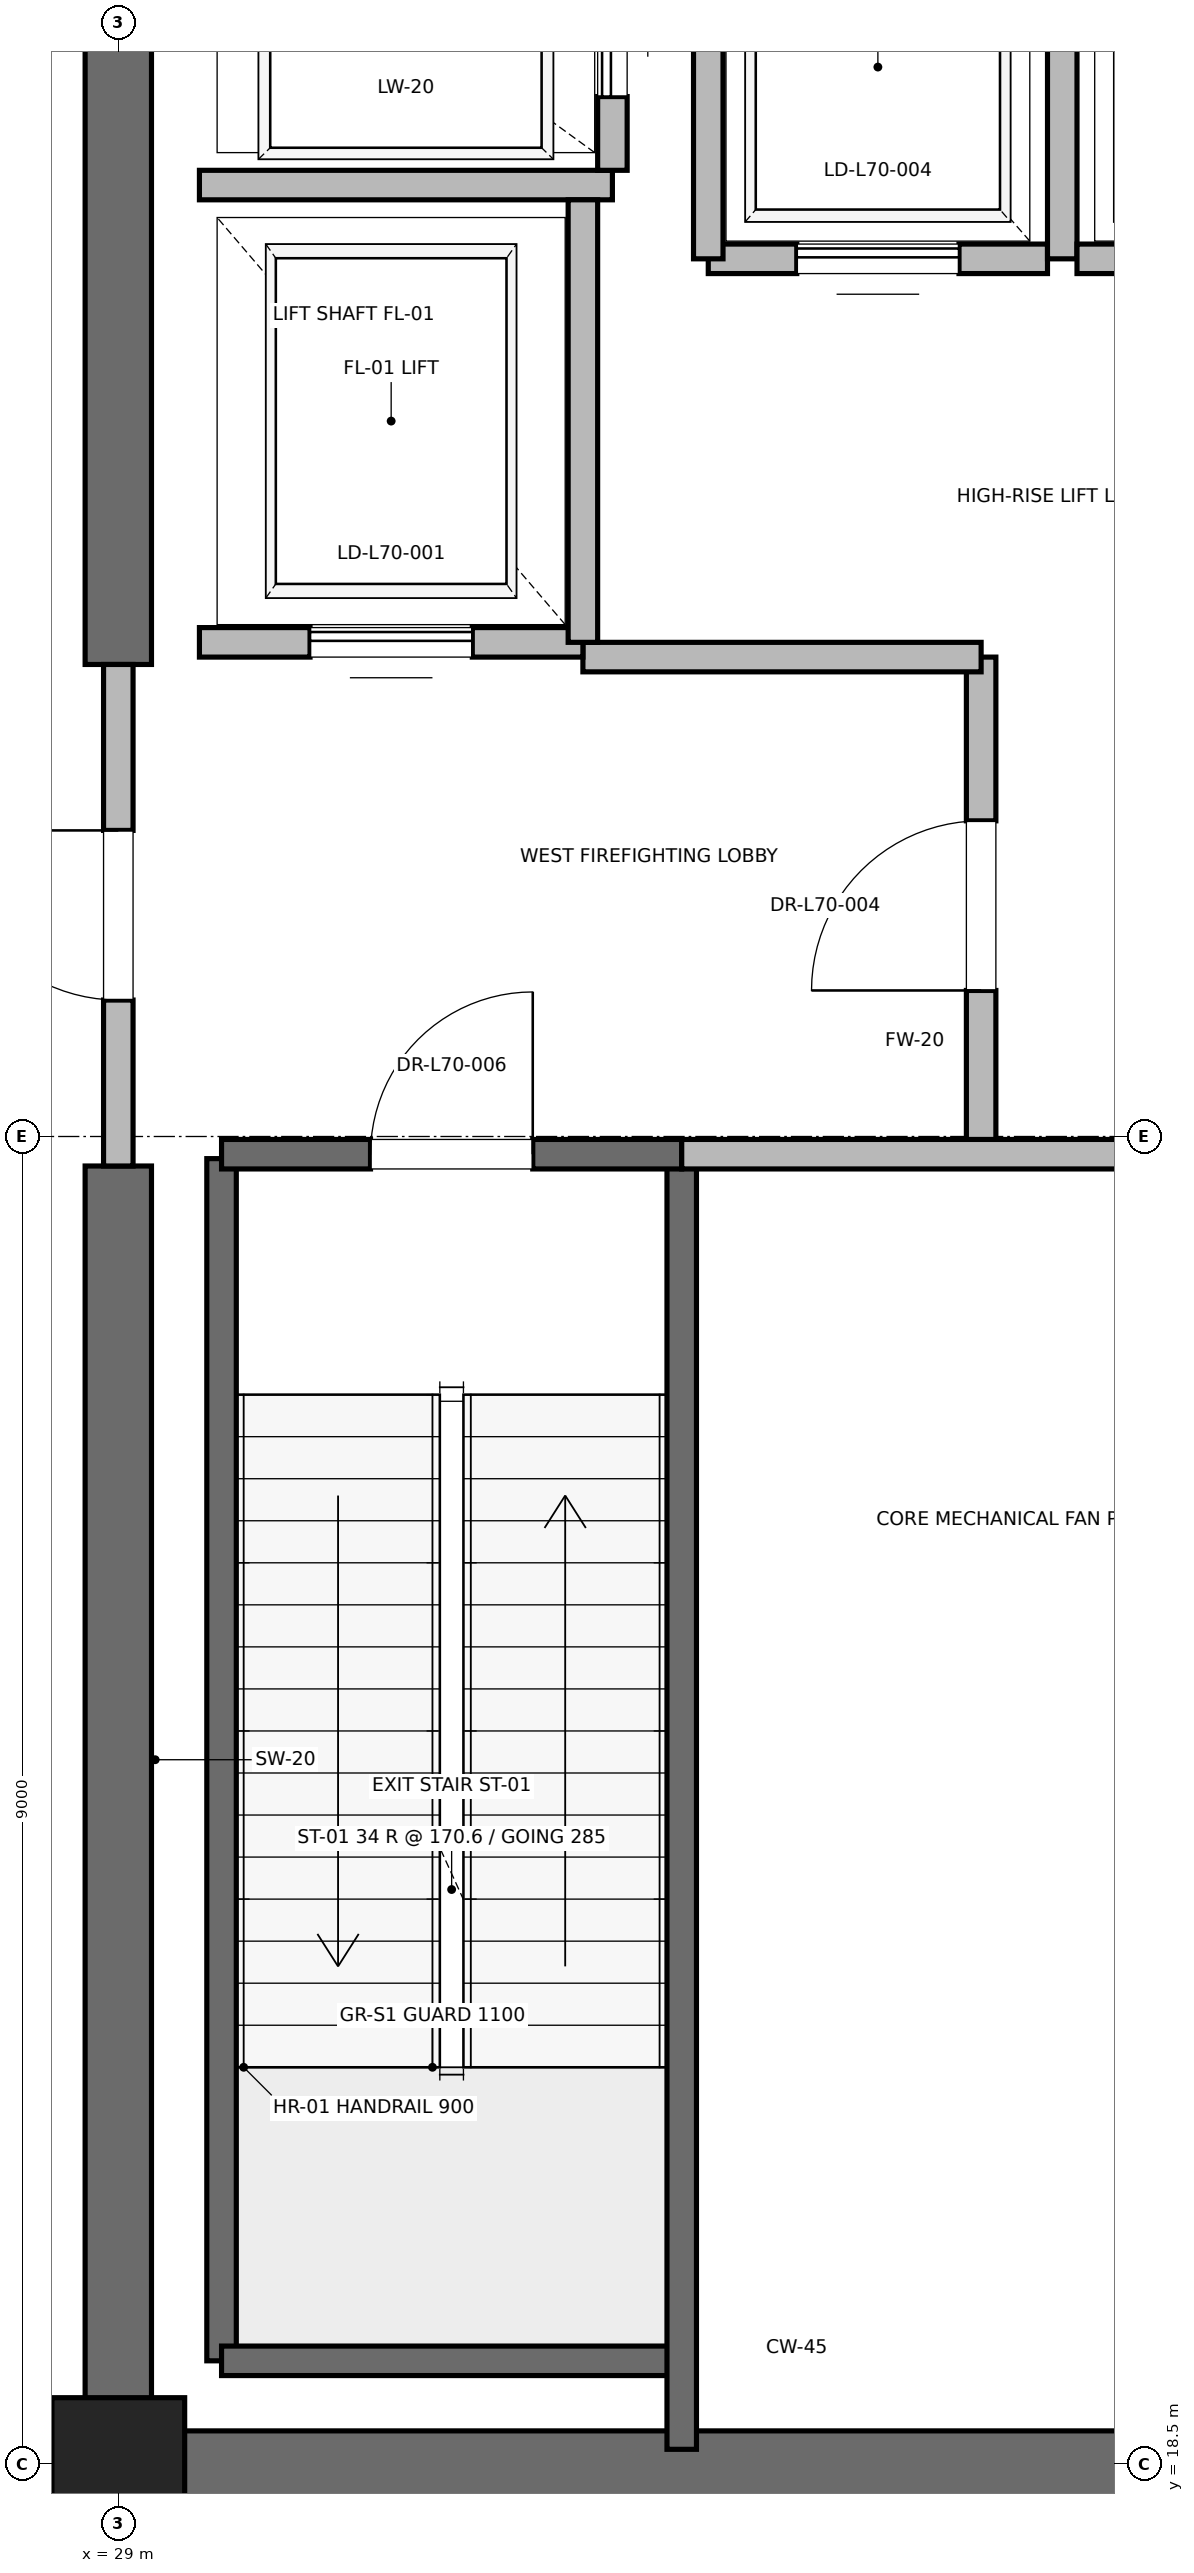
"""IFC4 building model, lengths in metres.
Left out: names, types, materials, properties, quantities, classifications, styles, units other than length and angle.
Written with IfcOpenShell. Run it as: python <this file> out.ifc"""

import sys

from ifc_helpers import new_model, si_unit, direction, frame, frame_2d, origin, origin_2d, place, context, subcontext, project, spatial, rectangle, extrude, element, fill, save


model = new_model("IFC4")
c1 = context("Model", 3, precision=1e-05, world=origin(), true_north=direction((0.0, 1.0)))
c2 = subcontext(c1, "Body", "Model", "MODEL_VIEW")
j1 = project(units=[si_unit("LENGTHUNIT", "METRE"), si_unit("PLANEANGLEUNIT", "RADIAN")], contexts=[c1])
p1 = place(None, origin())
s1 = spatial("IfcSite", under=j1, at=p1, CompositionType="ELEMENT")
p2 = place(p1, origin())
s2 = spatial("IfcBuilding", under=s1, at=p2, CompositionType="ELEMENT")
p3 = place(p2, frame((0.0, 0.0, 301.0)))
s3 = spatial("IfcBuildingStorey", under=s2, at=p3, CompositionType="ELEMENT", Elevation=301.0)
p4 = place(p3, frame((29.0, 18.5, 0.0), z_axis=(0.0, 0.0, 1.0), x_axis=(1.0, 0.0, 0.0)))
e1 = element("IfcColumn", 1, at=p4, inside=s3, PredefinedType="PILASTER", context=c2, shape_type="SweptSolid", body=[
    extrude(rectangle(XDim=0.9, YDim=0.9, at=origin_2d()), origin(), (0.0, 0.0, 1.0), 5.8),
])
p5 = place(p3, frame((29.0, 18.5, 0.0), z_axis=(0.0, 0.0, 1.0), x_axis=(1.0, 0.0, 0.0)))
e2 = element("IfcWall", 2, at=p5, inside=s3, PredefinedType="SHEAR", context=c2, shape_type="SweptSolid", body=[
    extrude(rectangle(XDim=9.2, YDim=0.45, at=frame_2d((4.6, 0.0))), origin(), (0.0, 0.0, 1.0), 5.585),
])
p6 = place(p3, frame((29.0, 18.5, 0.0), z_axis=(0.0, 0.0, 1.0), x_axis=(0.0, 1.0, 0.0)))
e3 = element("IfcWall", 3, at=p6, inside=s3, PredefinedType="SHEAR", context=c2, shape_type="SweptSolid", body=[
    extrude(rectangle(XDim=8.8, YDim=0.45, at=frame_2d((4.4, 0.0))), origin(), (0.0, 0.0, 1.0), 5.585),
])
p7 = place(p3, frame((29.0, 30.7, 0.0), z_axis=(0.0, 0.0, 1.0), x_axis=(0.0, 1.0, 0.0)))
e4 = element("IfcWall", 4, at=p7, inside=s3, PredefinedType="SHEAR", context=c2, shape_type="SweptSolid", body=[
    extrude(rectangle(XDim=5.8, YDim=0.45, at=frame_2d((2.9, 0.0))), origin(), (0.0, 0.0, 1.0), 5.585),
])
p8 = place(p3, frame((29.7, 19.2, 0.0), z_axis=(0.0, 0.0, 1.0), x_axis=(0.0, 1.0, 0.0)))
e5 = element("IfcWall", 5, at=p8, inside=s3, PredefinedType="SOLIDWALL", context=c2, shape_type="SweptSolid", body=[
    extrude(rectangle(XDim=8.15, YDim=0.2, at=frame_2d((4.075, 0.0))), origin(), (0.0, 0.0, 1.0), 5.585),
])
p9 = place(p3, frame((29.7, 19.2, 0.0), z_axis=(0.0, 0.0, 1.0), x_axis=(1.0, 0.0, 0.0)))
e6 = element("IfcWall", 6, at=p9, inside=s3, PredefinedType="SOLIDWALL", context=c2, shape_type="SweptSolid", body=[
    extrude(rectangle(XDim=3.12, YDim=0.2, at=frame_2d((1.56, 0.0))), origin(), (0.0, 0.0, 1.0), 5.585),
])
p10 = place(p3, frame((32.82, 18.6, 0.0), z_axis=(0.0, 0.0, 1.0), x_axis=(0.0, 1.0, 0.0)))
e7 = element("IfcWall", 7, at=p10, inside=s3, PredefinedType="SOLIDWALL", context=c2, shape_type="SweptSolid", body=[
    extrude(rectangle(XDim=8.78, YDim=0.2, at=frame_2d((4.39, 0.0))), origin(), (0.0, 0.0, 1.0), 5.585),
])
p11 = place(p3, frame((29.7, 27.38, 0.0), z_axis=(0.0, 0.0, 1.0), x_axis=(1.0, 0.0, 0.0)))
e8 = element("IfcWall", 8, at=p11, inside=s3, PredefinedType="SOLIDWALL", context=c2, shape_type="SweptSolid", body=[
    extrude(rectangle(XDim=3.12, YDim=0.2, at=frame_2d((1.56, 0.0))), origin(), (0.0, 0.0, 1.0), 5.585),
])
p12 = place(p11, frame((1.01, 0.0, 0.0)))
e9 = element("IfcOpeningElement", 9, at=p12, cuts=e8, PredefinedType="OPENING", context=c2, shape_type="SweptSolid", body=[
    extrude(rectangle(XDim=1.1, YDim=2.15, at=frame_2d((0.55, 1.075))), frame((0.0, 0.1, 0.0), z_axis=(0.0, -1.0, 0.0), x_axis=(1.0, 0.0, 0.0)), (0.0, 0.0, 1.0), 0.2),
])
p13 = place(p3, frame((34.85, 27.38, 0.0), z_axis=(0.0, 0.0, 1.0), x_axis=(0.0, 1.0, 0.0)))
e10 = element("IfcWall", 10, at=p13, inside=s3, PredefinedType="PARTITIONING", context=c2, shape_type="SweptSolid", body=[
    extrude(rectangle(XDim=3.37, YDim=0.2, at=frame_2d((1.685, 0.0))), origin(), (0.0, 0.0, 1.0), 5.585),
])
p14 = place(p13, frame((1.11, 0.0, 0.0)))
e11 = element("IfcOpeningElement", 11, at=p14, cuts=e10, PredefinedType="OPENING", context=c2, shape_type="SweptSolid", body=[
    extrude(rectangle(XDim=1.15, YDim=2.2, at=frame_2d((0.575, 1.1))), frame((0.0, 0.1, 0.0), z_axis=(0.0, -1.0, 0.0), x_axis=(1.0, 0.0, 0.0)), (0.0, 0.0, 1.0), 0.2),
])
p15 = place(p3, frame((29.0, 27.3, 0.0), z_axis=(0.0, 0.0, 1.0), x_axis=(0.0, 1.0, 0.0)))
e12 = element("IfcWall", 12, at=p15, inside=s3, PredefinedType="PARTITIONING", context=c2, shape_type="SweptSolid", body=[
    extrude(rectangle(XDim=3.4, YDim=0.2, at=frame_2d((1.7, 0.0))), origin(), (0.0, 0.0, 1.0), 4.665),
])
p16 = place(p15, frame((1.125, 0.0, 0.0)))
e13 = element("IfcOpeningElement", 13, at=p16, cuts=e12, PredefinedType="OPENING", context=c2, shape_type="SweptSolid", body=[
    extrude(rectangle(XDim=1.15, YDim=2.2, at=frame_2d((0.575, 1.1))), frame((0.0, 0.1, 0.0), z_axis=(0.0, -1.0, 0.0), x_axis=(1.0, 0.0, 0.0)), (0.0, 0.0, 1.0), 0.2),
])
p17 = place(p3, frame((32.82, 27.38, 0.0), z_axis=(0.0, 0.0, 1.0), x_axis=(1.0, 0.0, 0.0)))
e14 = element("IfcWall", 14, at=p17, inside=s3, PredefinedType="PARTITIONING", context=c2, shape_type="SweptSolid", body=[
    extrude(rectangle(XDim=5.62, YDim=0.2, at=frame_2d((2.81, 0.0))), origin(), (0.0, 0.0, 1.0), 5.585),
])
p18 = place(p3, frame((32.15, 30.75, 0.0), z_axis=(0.0, 0.0, 1.0), x_axis=(1.0, 0.0, 0.0)))
e15 = element("IfcWall", 15, at=p18, inside=s3, PredefinedType="PARTITIONING", context=c2, shape_type="SweptSolid", body=[
    extrude(rectangle(XDim=2.7, YDim=0.2, at=frame_2d((1.35, 0.0))), origin(), (0.0, 0.0, 1.0), 5.585),
])
p19 = place(p3, frame((29.55, 30.85, 0.0), z_axis=(0.0, 0.0, 1.0), x_axis=(1.0, 0.0, 0.0)))
e16 = element("IfcWall", 16, at=p19, inside=s3, PredefinedType="SOLIDWALL", context=c2, shape_type="SweptSolid", body=[
    extrude(rectangle(XDim=2.6, YDim=0.2, at=frame_2d((1.3, 0.0))), origin(), (0.0, 0.0, 1.0), 4.665),
])
p20 = place(p19, frame((0.75, 0.0, 0.0)))
e17 = element("IfcOpeningElement", 17, at=p20, cuts=e16, PredefinedType="OPENING", context=c2, shape_type="SweptSolid", body=[
    extrude(rectangle(XDim=1.1, YDim=2.2, at=frame_2d((0.55, 1.1))), frame((0.0, 0.1, 0.0), z_axis=(0.0, -1.0, 0.0), x_axis=(1.0, 0.0, 0.0)), (0.0, 0.0, 1.0), 0.2),
])
p21 = place(p3, frame((29.55, 33.95, 0.0), z_axis=(0.0, 0.0, 1.0), x_axis=(1.0, 0.0, 0.0)))
e18 = element("IfcWall", 18, at=p21, inside=s3, PredefinedType="SOLIDWALL", context=c2, shape_type="SweptSolid", body=[
    extrude(rectangle(XDim=2.8, YDim=0.2, at=frame_2d((1.4, 0.0))), origin(), (0.0, 0.0, 1.0), 5.585),
])
p22 = place(p3, frame((32.15, 30.85, 0.0), z_axis=(0.0, 0.0, 1.0), x_axis=(0.0, 1.0, 0.0)))
e19 = element("IfcWall", 19, at=p22, inside=s3, PredefinedType="SOLIDWALL", context=c2, shape_type="SweptSolid", body=[
    extrude(rectangle(XDim=3.0, YDim=0.2, at=frame_2d((1.5, 0.0))), origin(), (0.0, 0.0, 1.0), 5.585),
])
p23 = place(p3, frame((32.35, 34.05, 0.0), z_axis=(0.0, 0.0, 1.0), x_axis=(0.0, 1.0, 0.0)))
e20 = element("IfcWall", 20, at=p23, inside=s3, PredefinedType="SOLIDWALL", context=c2, shape_type="SweptSolid", body=[
    extrude(rectangle(XDim=2.1, YDim=0.2, at=frame_2d((1.05, 0.0))), origin(), (0.0, 0.0, 1.0), 5.585),
])
p24 = place(p23, frame((0.5, 0.0, 0.0)))
e21 = element("IfcOpeningElement", 21, at=p24, cuts=e20, PredefinedType="OPENING", context=c2, shape_type="SweptSolid", body=[
    extrude(rectangle(XDim=1.1, YDim=2.2, at=frame_2d((0.55, 1.1))), frame((0.0, 0.1, 0.0), z_axis=(0.0, -1.0, 0.0), x_axis=(1.0, 0.0, 0.0)), (0.0, 0.0, 1.0), 0.2),
])
p25 = place(p3, frame((33.0, 33.45, 0.0), z_axis=(0.0, 0.0, 1.0), x_axis=(1.0, 0.0, 0.0)))
e22 = element("IfcWall", 22, at=p25, inside=s3, PredefinedType="SOLIDWALL", context=c2, shape_type="SweptSolid", body=[
    extrude(rectangle(XDim=2.3, YDim=0.2, at=frame_2d((1.15, 0.0))), origin(), (0.0, 0.0, 1.0), 5.585),
])
p26 = place(p25, frame((0.6, 0.0, 0.0)))
e23 = element("IfcOpeningElement", 23, at=p26, cuts=e22, PredefinedType="OPENING", context=c2, shape_type="SweptSolid", body=[
    extrude(rectangle(XDim=1.1, YDim=2.2, at=frame_2d((0.55, 1.1))), frame((0.0, 0.1, 0.0), z_axis=(0.0, -1.0, 0.0), x_axis=(1.0, 0.0, 0.0)), (0.0, 0.0, 1.0), 0.2),
])
p27 = place(p3, frame((33.0, 36.05, 0.0), z_axis=(0.0, 0.0, 1.0), x_axis=(0.0, -1.0, 0.0)))
e24 = element("IfcWall", 24, at=p27, inside=s3, PredefinedType="SOLIDWALL", context=c2, shape_type="SweptSolid", body=[
    extrude(rectangle(XDim=2.6, YDim=0.2, at=frame_2d((1.3, 0.0))), origin(), (0.0, 0.0, 1.0), 5.585),
])
p28 = place(p3, frame((35.4, 33.45, 0.0), z_axis=(0.0, 0.0, 1.0), x_axis=(0.0, 1.0, 0.0)))
e25 = element("IfcWall", 25, at=p28, inside=s3, PredefinedType="SOLIDWALL", context=c2, shape_type="SweptSolid", body=[
    extrude(rectangle(XDim=2.6, YDim=0.2, at=frame_2d((1.3, 0.0))), origin(), (0.0, 0.0, 1.0), 4.665),
])
p29 = place(p3, frame((35.5, 33.45, 0.0), z_axis=(0.0, 0.0, 1.0), x_axis=(1.0, 0.0, 0.0)))
e26 = element("IfcWall", 26, at=p29, inside=s3, PredefinedType="SOLIDWALL", context=c2, shape_type="SweptSolid", body=[
    extrude(rectangle(XDim=2.3, YDim=0.2, at=frame_2d((1.15, 0.0))), origin(), (0.0, 0.0, 1.0), 5.585),
])
p30 = place(p29, frame((0.6, 0.0, 0.0)))
e27 = element("IfcOpeningElement", 27, at=p30, cuts=e26, PredefinedType="OPENING", context=c2, shape_type="SweptSolid", body=[
    extrude(rectangle(XDim=1.1, YDim=2.2, at=frame_2d((0.55, 1.1))), frame((0.0, 0.1, 0.0), z_axis=(0.0, -1.0, 0.0), x_axis=(1.0, 0.0, 0.0)), (0.0, 0.0, 1.0), 0.2),
])
p31 = place(p12, origin())
e28 = element("IfcDoor", 28, at=p31, inside=s3, OperationType="SINGLE_SWING_RIGHT", PredefinedType="DOOR", context=c2, shape_type="SweptSolid", body=[
    extrude(rectangle(XDim=1.1, YDim=2.15, at=frame_2d((0.55, 1.075))), frame((0.0, 0.025, 0.0), z_axis=(0.0, -1.0, 0.0), x_axis=(1.0, 0.0, 0.0)), (0.0, 0.0, 1.0), 0.05),
])
fill(e9, e28)
p32 = place(p14, origin())
e29 = element("IfcDoor", 29, at=p32, inside=s3, OperationType="SINGLE_SWING_LEFT", PredefinedType="DOOR", context=c2, shape_type="SweptSolid", body=[
    extrude(rectangle(XDim=1.15, YDim=2.2, at=frame_2d((0.575, 1.1))), frame((0.0, 0.025, 0.0), z_axis=(0.0, -1.0, 0.0), x_axis=(1.0, 0.0, 0.0)), (0.0, 0.0, 1.0), 0.05),
])
fill(e11, e29)
p33 = place(p16, origin())
e30 = element("IfcDoor", 30, at=p33, inside=s3, OperationType="SINGLE_SWING_RIGHT", PredefinedType="DOOR", context=c2, shape_type="SweptSolid", body=[
    extrude(rectangle(XDim=1.15, YDim=2.2, at=frame_2d((0.575, 1.1))), frame((0.0, 0.025, 0.0), z_axis=(0.0, -1.0, 0.0), x_axis=(1.0, 0.0, 0.0)), (0.0, 0.0, 1.0), 0.05),
])
fill(e13, e30)
p34 = place(p20, origin())
e31 = element("IfcDoor", 31, at=p34, inside=s3, OperationType="SLIDING_TO_RIGHT", PredefinedType="DOOR", context=c2, shape_type="SweptSolid", body=[
    extrude(rectangle(XDim=1.1, YDim=2.2, at=frame_2d((0.55, 1.1))), frame((0.0, 0.025, 0.0), z_axis=(0.0, -1.0, 0.0), x_axis=(1.0, 0.0, 0.0)), (0.0, 0.0, 1.0), 0.05),
])
fill(e17, e31)
p35 = place(p24, origin())
e32 = element("IfcDoor", 32, at=p35, inside=s3, OperationType="SLIDING_TO_RIGHT", PredefinedType="DOOR", context=c2, shape_type="SweptSolid", body=[
    extrude(rectangle(XDim=1.1, YDim=2.2, at=frame_2d((0.55, 1.1))), frame((0.0, 0.025, 0.0), z_axis=(0.0, -1.0, 0.0), x_axis=(1.0, 0.0, 0.0)), (0.0, 0.0, 1.0), 0.05),
])
fill(e21, e32)
p36 = place(p26, origin())
e33 = element("IfcDoor", 33, at=p36, inside=s3, OperationType="SLIDING_TO_RIGHT", PredefinedType="DOOR", context=c2, shape_type="SweptSolid", body=[
    extrude(rectangle(XDim=1.1, YDim=2.2, at=frame_2d((0.55, 1.1))), frame((0.0, 0.025, 0.0), z_axis=(0.0, -1.0, 0.0), x_axis=(1.0, 0.0, 0.0)), (0.0, 0.0, 1.0), 0.05),
])
fill(e23, e33)
save(model, sys.argv[1])
